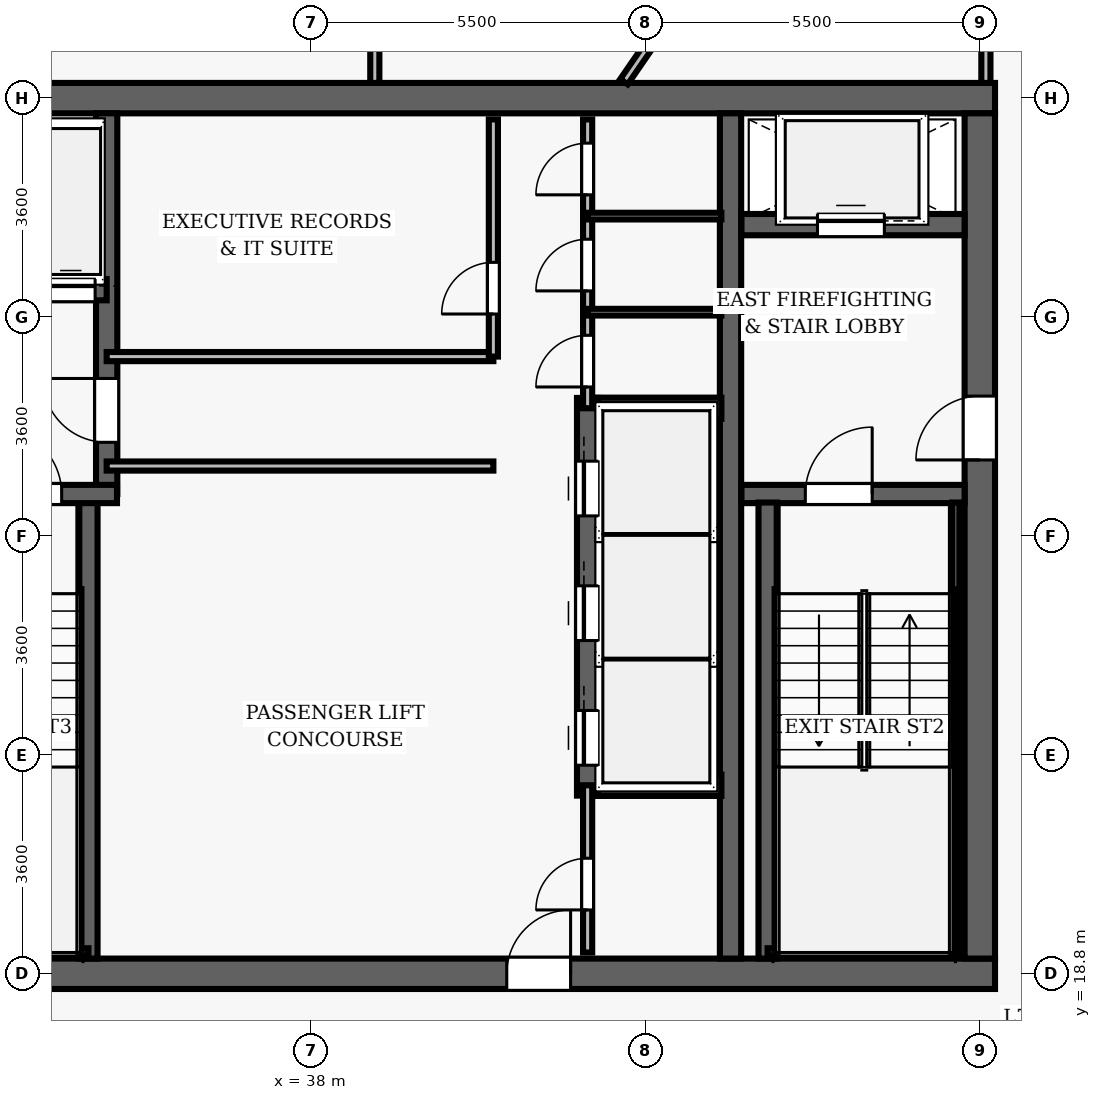
"""IFC4 building model, lengths in metres.
Left out: names, types, materials, properties, quantities, classifications, styles, units other than length and angle.
Written with IfcOpenShell. Run it as: python <this file> out.ifc"""

import sys

from ifc_helpers import new_model, si_unit, direction, frame, frame_2d, origin, place, context, subcontext, project, spatial, rectangle, extrude, element, fill, save


model = new_model("IFC4")
c1 = context("Model", 3, precision=1e-05, world=origin(), true_north=direction((0.0, 1.0)))
c2 = subcontext(c1, "Body", "Model", "MODEL_VIEW")
j1 = project(units=[si_unit("LENGTHUNIT", "METRE"), si_unit("PLANEANGLEUNIT", "RADIAN")], contexts=[c1])
p1 = place(None, origin())
s1 = spatial("IfcSite", under=j1, at=p1, CompositionType="ELEMENT")
p2 = place(p1, origin())
s2 = spatial("IfcBuilding", under=s1, at=p2, CompositionType="ELEMENT")
p3 = place(p2, frame((0.0, 0.0, 303.65)))
s3 = spatial("IfcBuildingStorey", under=s2, at=p3, CompositionType="ELEMENT", Elevation=303.65)
p4 = place(p3, frame((26.75, 18.8, 0.0), z_axis=(0.0, 0.0, 1.0), x_axis=(1.0, 0.0, 0.0)))
e1 = element("IfcWall", 1, at=p4, inside=s3, PredefinedType="SHEAR", context=c2, shape_type="SweptSolid", body=[
    extrude(rectangle(XDim=22.5, YDim=0.5, at=frame_2d((11.25, 0.0))), origin(), (0.0, 0.0, 1.0), 3.85),
])
p5 = place(p4, frame((14.47, 0.0, 0.0)))
e2 = element("IfcOpeningElement", 2, at=p5, cuts=e1, PredefinedType="OPENING", context=c2, shape_type="SweptSolid", body=[
    extrude(rectangle(XDim=1.05, YDim=2.15, at=frame_2d((0.525, 1.075))), frame((0.0, 0.26, 0.0), z_axis=(0.0, -1.0, 0.0), x_axis=(1.0, 0.0, 0.0)), (0.0, 0.0, 1.0), 0.52),
])
p6 = place(p3, frame((26.75, 33.2, 0.0), z_axis=(0.0, 0.0, 1.0), x_axis=(1.0, 0.0, 0.0)))
e3 = element("IfcWall", 3, at=p6, inside=s3, PredefinedType="SHEAR", context=c2, shape_type="SweptSolid", body=[
    extrude(rectangle(XDim=22.5, YDim=0.5, at=frame_2d((11.25, 0.0))), origin(), (0.0, 0.0, 1.0), 3.85),
])
p7 = place(p3, frame((49.0, 19.05, 0.0), z_axis=(0.0, 0.0, 1.0), x_axis=(0.0, 1.0, 0.0)))
e4 = element("IfcWall", 4, at=p7, inside=s3, PredefinedType="SHEAR", context=c2, shape_type="SweptSolid", body=[
    extrude(rectangle(XDim=13.9, YDim=0.5, at=frame_2d((6.95, 0.0))), origin(), (0.0, 0.0, 1.0), 3.85),
])
p8 = place(p7, frame((8.2, 0.0, 0.0)))
e5 = element("IfcOpeningElement", 5, at=p8, cuts=e4, PredefinedType="OPENING", context=c2, shape_type="SweptSolid", body=[
    extrude(rectangle(XDim=1.05, YDim=2.15, at=frame_2d((0.525, 1.075))), frame((0.0, 0.26, 0.0), z_axis=(0.0, -1.0, 0.0), x_axis=(1.0, 0.0, 0.0)), (0.0, 0.0, 1.0), 0.52),
])
p9 = place(p3, frame((44.9, 19.05, 0.0), z_axis=(0.0, 0.0, 1.0), x_axis=(0.0, 1.0, 0.0)))
e6 = element("IfcWall", 6, at=p9, inside=s3, PredefinedType="SHEAR", context=c2, shape_type="SweptSolid", body=[
    extrude(rectangle(XDim=13.9, YDim=0.35, at=frame_2d((6.95, 0.0))), origin(), (0.0, 0.0, 1.0), 3.85),
])
p10 = place(p3, frame((45.08, 26.69, 0.0), z_axis=(0.0, 0.0, 1.0), x_axis=(1.0, 0.0, 0.0)))
e7 = element("IfcWall", 7, at=p10, inside=s3, PredefinedType="SHEAR", context=c2, shape_type="SweptSolid", body=[
    extrude(rectangle(XDim=3.67, YDim=0.3, at=frame_2d((1.835, 0.0))), origin(), (0.0, 0.0, 1.0), 3.85),
])
p11 = place(p10, frame((1.05, 0.0, 0.0)))
e8 = element("IfcOpeningElement", 8, at=p11, cuts=e7, PredefinedType="OPENING", context=c2, shape_type="SweptSolid", body=[
    extrude(rectangle(XDim=1.1, YDim=2.15, at=frame_2d((0.55, 1.075))), frame((0.0, 0.16, 0.0), z_axis=(0.0, -1.0, 0.0), x_axis=(1.0, 0.0, 0.0)), (0.0, 0.0, 1.0), 0.32),
])
p12 = place(p3, frame((45.51, 19.05, 0.0), z_axis=(0.0, 0.0, 1.0), x_axis=(0.0, 1.0, 0.0)))
e9 = element("IfcWall", 9, at=p12, inside=s3, PredefinedType="SHEAR", context=c2, shape_type="SweptSolid", body=[
    extrude(rectangle(XDim=7.5, YDim=0.3, at=frame_2d((3.75, 0.0))), origin(), (0.0, 0.0, 1.0), 3.85),
])
p13 = place(p3, frame((48.605, 19.1, 0.0), z_axis=(0.0, 0.0, 1.0), x_axis=(0.0, 1.0, 0.0)))
e10 = element("IfcWall", 10, at=p13, inside=s3, PredefinedType="SHEAR", context=c2, shape_type="SweptSolid", body=[
    extrude(rectangle(XDim=7.45, YDim=0.12, at=frame_2d((3.725, 0.0))), origin(), (0.0, 0.0, 1.0), 3.85),
])
p14 = place(p3, frame((45.51, 19.16, 0.0), z_axis=(0.0, 0.0, 1.0), x_axis=(1.0, 0.0, 0.0)))
e11 = element("IfcWall", 11, at=p14, inside=s3, PredefinedType="SHEAR", context=c2, shape_type="SweptSolid", body=[
    extrude(rectangle(XDim=3.095, YDim=0.12, at=frame_2d((1.547, 0.0))), origin(), (0.0, 0.0, 1.0), 3.85),
])
p15 = place(p3, frame((45.08, 31.12, 0.0), z_axis=(0.0, 0.0, 1.0), x_axis=(1.0, 0.0, 0.0)))
e12 = element("IfcWall", 12, at=p15, inside=s3, PredefinedType="SHEAR", context=c2, shape_type="SweptSolid", body=[
    extrude(rectangle(XDim=3.67, YDim=0.35, at=frame_2d((1.835, 0.0))), origin(), (0.0, 0.0, 1.0), 3.015),
])
p16 = place(p15, frame((1.25, 0.0, 0.0)))
e13 = element("IfcOpeningElement", 13, at=p16, cuts=e12, PredefinedType="OPENING", context=c2, shape_type="SweptSolid", body=[
    extrude(rectangle(XDim=1.1, YDim=2.15, at=frame_2d((0.55, 1.075))), frame((0.0, 0.185, 0.0), z_axis=(0.0, -1.0, 0.0), x_axis=(1.0, 0.0, 0.0)), (0.0, 0.0, 1.0), 0.37),
])
p17 = place(p3, frame((34.34, 19.05, 0.0), z_axis=(0.0, 0.0, 1.0), x_axis=(0.0, 1.0, 0.0)))
e14 = element("IfcWall", 14, at=p17, inside=s3, PredefinedType="SHEAR", context=c2, shape_type="SweptSolid", body=[
    extrude(rectangle(XDim=7.5, YDim=0.3, at=frame_2d((3.75, 0.0))), origin(), (0.0, 0.0, 1.0), 3.85),
])
p18 = place(p3, frame((34.64, 26.69, 0.0), z_axis=(0.0, 0.0, 1.0), x_axis=(0.0, 1.0, 0.0)))
e15 = element("IfcWall", 15, at=p18, inside=s3, PredefinedType="SHEAR", context=c2, shape_type="SweptSolid", body=[
    extrude(rectangle(XDim=6.26, YDim=0.35, at=frame_2d((3.13, 0.0))), origin(), (0.0, 0.0, 1.0), 3.85),
])
p19 = place(p18, frame((0.85, 0.0, 0.0)))
e16 = element("IfcOpeningElement", 16, at=p19, cuts=e15, PredefinedType="OPENING", context=c2, shape_type="SweptSolid", body=[
    extrude(rectangle(XDim=1.05, YDim=2.15, at=frame_2d((0.525, 1.075))), frame((0.0, 0.185, 0.0), z_axis=(0.0, -1.0, 0.0), x_axis=(1.0, 0.0, 0.0)), (0.0, 0.0, 1.0), 0.37),
])
p20 = place(p3, frame((31.25, 26.69, 0.0), z_axis=(0.0, 0.0, 1.0), x_axis=(1.0, 0.0, 0.0)))
e17 = element("IfcWall", 17, at=p20, inside=s3, PredefinedType="SHEAR", context=c2, shape_type="SweptSolid", body=[
    extrude(rectangle(XDim=3.56, YDim=0.3, at=frame_2d((1.78, 0.0))), origin(), (0.0, 0.0, 1.0), 3.85),
])
p21 = place(p20, frame((1.55, 0.0, 0.0)))
e18 = element("IfcOpeningElement", 18, at=p21, cuts=e17, PredefinedType="OPENING", context=c2, shape_type="SweptSolid", body=[
    extrude(rectangle(XDim=1.1, YDim=2.15, at=frame_2d((0.55, 1.075))), frame((0.0, 0.16, 0.0), z_axis=(0.0, -1.0, 0.0), x_axis=(1.0, 0.0, 0.0)), (0.0, 0.0, 1.0), 0.32),
])
p22 = place(p3, frame((31.3, 19.16, 0.0), z_axis=(0.0, 0.0, 1.0), x_axis=(1.0, 0.0, 0.0)))
e19 = element("IfcWall", 19, at=p22, inside=s3, PredefinedType="SHEAR", context=c2, shape_type="SweptSolid", body=[
    extrude(rectangle(XDim=3.04, YDim=0.12, at=frame_2d((1.52, 0.0))), origin(), (0.0, 0.0, 1.0), 3.85),
])
p23 = place(p3, frame((32.23, 30.05, 0.0), z_axis=(0.0, 0.0, 1.0), x_axis=(1.0, 0.0, 0.0)))
e20 = element("IfcWall", 20, at=p23, inside=s3, PredefinedType="SHEAR", context=c2, shape_type="SweptSolid", body=[
    extrude(rectangle(XDim=2.41, YDim=0.35, at=frame_2d((1.205, 0.0))), origin(), (0.0, 0.0, 1.0), 3.015),
])
p24 = place(p23, frame((0.42, 0.0, 0.0)))
e21 = element("IfcOpeningElement", 21, at=p24, cuts=e20, PredefinedType="OPENING", context=c2, shape_type="SweptSolid", body=[
    extrude(rectangle(XDim=0.8, YDim=2.15, at=frame_2d((0.4, 1.075))), frame((0.0, 0.185, 0.0), z_axis=(0.0, -1.0, 0.0), x_axis=(1.0, 0.0, 0.0)), (0.0, 0.0, 1.0), 0.37),
])
p25 = place(p23, frame((1.42, 0.0, 0.0)))
e22 = element("IfcOpeningElement", 22, at=p25, cuts=e20, PredefinedType="OPENING", context=c2, shape_type="SweptSolid", body=[
    extrude(rectangle(XDim=0.8, YDim=2.15, at=frame_2d((0.4, 1.075))), frame((0.0, 0.185, 0.0), z_axis=(0.0, -1.0, 0.0), x_axis=(1.0, 0.0, 0.0)), (0.0, 0.0, 1.0), 0.37),
])
p26 = place(p3, frame((42.55, 21.73, 0.0), z_axis=(0.0, 0.0, 1.0), x_axis=(0.0, 1.0, 0.0)))
e23 = element("IfcWall", 23, at=p26, inside=s3, PredefinedType="SHEAR", context=c2, shape_type="SweptSolid", body=[
    extrude(rectangle(XDim=6.54, YDim=0.35, at=frame_2d((3.27, 0.0))), origin(), (0.0, 0.0, 1.0), 3.015),
])
p27 = place(p26, frame((0.5, 0.0, 0.0)))
e24 = element("IfcOpeningElement", 24, at=p27, cuts=e23, PredefinedType="OPENING", context=c2, shape_type="SweptSolid", body=[
    extrude(rectangle(XDim=0.9, YDim=2.15, at=frame_2d((0.45, 1.075))), frame((0.0, 0.185, 0.0), z_axis=(0.0, -1.0, 0.0), x_axis=(1.0, 0.0, 0.0)), (0.0, 0.0, 1.0), 0.37),
])
p28 = place(p26, frame((2.55, 0.0, 0.0)))
e25 = element("IfcOpeningElement", 25, at=p28, cuts=e23, PredefinedType="OPENING", context=c2, shape_type="SweptSolid", body=[
    extrude(rectangle(XDim=0.9, YDim=2.15, at=frame_2d((0.45, 1.075))), frame((0.0, 0.185, 0.0), z_axis=(0.0, -1.0, 0.0), x_axis=(1.0, 0.0, 0.0)), (0.0, 0.0, 1.0), 0.37),
])
p29 = place(p26, frame((4.6, 0.0, 0.0)))
e26 = element("IfcOpeningElement", 26, at=p29, cuts=e23, PredefinedType="OPENING", context=c2, shape_type="SweptSolid", body=[
    extrude(rectangle(XDim=0.9, YDim=2.15, at=frame_2d((0.45, 1.075))), frame((0.0, 0.185, 0.0), z_axis=(0.0, -1.0, 0.0), x_axis=(1.0, 0.0, 0.0)), (0.0, 0.0, 1.0), 0.37),
])
for number, where, z_axis, x_axis in (
    (27, (42.72, 21.9, 0.0), (0.0, 0.0, 1.0), (1.0, 0.0, 0.0)),
    (28, (42.72, 28.1, 0.0), (0.0, 0.0, 1.0), (1.0, 0.0, 0.0)),
):
    element("IfcWall", number, at=place(p3, frame(where, z_axis=z_axis, x_axis=x_axis)), inside=s3, PredefinedType="SHEAR", context=c2, shape_type="SweptSolid", body=[
        extrude(rectangle(XDim=2.03, YDim=0.35, at=frame_2d((1.015, 0.0))), origin(), (0.0, 0.0, 1.0), 3.015),
    ])
for number, where, z_axis, x_axis in (
    (29, (34.64, 27.15, 0.0), (0.0, 0.0, 1.0), (1.0, 0.0, 0.0)),
    (30, (34.64, 28.95, 0.0), (0.0, 0.0, 1.0), (1.0, 0.0, 0.0)),
):
    element("IfcWall", number, at=place(p3, frame(where, z_axis=z_axis, x_axis=x_axis)), inside=s3, PredefinedType="PARTITIONING", context=c2, shape_type="SweptSolid", body=[
        extrude(rectangle(XDim=6.36, YDim=0.15, at=frame_2d((3.18, 0.0))), origin(), (0.0, 0.0, 1.0), 3.015),
    ])
p30 = place(p3, frame((41.0, 28.95, 0.0), z_axis=(0.0, 0.0, 1.0), x_axis=(0.0, 1.0, 0.0)))
e31 = element("IfcWall", 31, at=p30, inside=s3, PredefinedType="PARTITIONING", context=c2, shape_type="SweptSolid", body=[
    extrude(rectangle(XDim=3.9, YDim=0.15, at=frame_2d((1.95, 0.0))), origin(), (0.0, 0.0, 1.0), 3.015),
])
p31 = place(p30, frame((0.7, 0.0, 0.0)))
e32 = element("IfcOpeningElement", 32, at=p31, cuts=e31, PredefinedType="OPENING", context=c2, shape_type="SweptSolid", body=[
    extrude(rectangle(XDim=0.85, YDim=2.1, at=frame_2d((0.425, 1.05))), frame((0.0, 0.085, 0.0), z_axis=(0.0, -1.0, 0.0), x_axis=(1.0, 0.0, 0.0)), (0.0, 0.0, 1.0), 0.17),
])
p32 = place(p3, frame((42.55, 28.1, 0.0), z_axis=(0.0, 0.0, 1.0), x_axis=(0.0, 1.0, 0.0)))
e33 = element("IfcWall", 33, at=p32, inside=s3, PredefinedType="PARTITIONING", context=c2, shape_type="SweptSolid", body=[
    extrude(rectangle(XDim=4.75, YDim=0.15, at=frame_2d((2.375, 0.0))), origin(), (0.0, 0.0, 1.0), 3.015),
])
p33 = place(p32, frame((0.35, 0.0, 0.0)))
e34 = element("IfcOpeningElement", 34, at=p33, cuts=e33, PredefinedType="OPENING", context=c2, shape_type="SweptSolid", body=[
    extrude(rectangle(XDim=0.85, YDim=2.1, at=frame_2d((0.425, 1.05))), frame((0.0, 0.085, 0.0), z_axis=(0.0, -1.0, 0.0), x_axis=(1.0, 0.0, 0.0)), (0.0, 0.0, 1.0), 0.17),
])
p34 = place(p32, frame((1.93, 0.0, 0.0)))
e35 = element("IfcOpeningElement", 35, at=p34, cuts=e33, PredefinedType="OPENING", context=c2, shape_type="SweptSolid", body=[
    extrude(rectangle(XDim=0.85, YDim=2.1, at=frame_2d((0.425, 1.05))), frame((0.0, 0.085, 0.0), z_axis=(0.0, -1.0, 0.0), x_axis=(1.0, 0.0, 0.0)), (0.0, 0.0, 1.0), 0.17),
])
p35 = place(p32, frame((3.51, 0.0, 0.0)))
e36 = element("IfcOpeningElement", 36, at=p35, cuts=e33, PredefinedType="OPENING", context=c2, shape_type="SweptSolid", body=[
    extrude(rectangle(XDim=0.85, YDim=2.1, at=frame_2d((0.425, 1.05))), frame((0.0, 0.085, 0.0), z_axis=(0.0, -1.0, 0.0), x_axis=(1.0, 0.0, 0.0)), (0.0, 0.0, 1.0), 0.17),
])
for number, where, z_axis, x_axis in (
    (37, (42.55, 29.68, 0.0), (0.0, 0.0, 1.0), (1.0, 0.0, 0.0)),
    (38, (42.55, 31.26, 0.0), (0.0, 0.0, 1.0), (1.0, 0.0, 0.0)),
):
    element("IfcWall", number, at=place(p3, frame(where, z_axis=z_axis, x_axis=x_axis)), inside=s3, PredefinedType="PARTITIONING", context=c2, shape_type="SweptSolid", body=[
        extrude(rectangle(XDim=2.2, YDim=0.11, at=frame_2d((1.1, 0.0))), origin(), (0.0, 0.0, 1.0), 3.015),
    ])
p36 = place(p3, frame((42.55, 19.15, 0.0), z_axis=(0.0, 0.0, 1.0), x_axis=(0.0, 1.0, 0.0)))
e39 = element("IfcWall", 39, at=p36, inside=s3, PredefinedType="PARTITIONING", context=c2, shape_type="SweptSolid", body=[
    extrude(rectangle(XDim=2.75, YDim=0.15, at=frame_2d((1.375, 0.0))), origin(), (0.0, 0.0, 1.0), 3.015),
])
p37 = place(p36, frame((0.7, 0.0, 0.0)))
e40 = element("IfcOpeningElement", 40, at=p37, cuts=e39, PredefinedType="OPENING", context=c2, shape_type="SweptSolid", body=[
    extrude(rectangle(XDim=0.85, YDim=2.1, at=frame_2d((0.425, 1.05))), frame((0.0, 0.085, 0.0), z_axis=(0.0, -1.0, 0.0), x_axis=(1.0, 0.0, 0.0)), (0.0, 0.0, 1.0), 0.17),
])
p38 = place(p3, frame((49.1, 33.45, 0.0), z_axis=(0.0, 0.0, 1.0), x_axis=(0.0, 1.0, 0.0)))
e41 = element("IfcWall", 41, at=p38, inside=s3, PredefinedType="PARTITIONING", context=c2, shape_type="SweptSolid", body=[
    extrude(rectangle(XDim=7.95, YDim=0.15, at=frame_2d((3.975, 0.0))), origin(), (0.0, 0.0, 1.0), 3.015),
])
p39 = place(p3, frame((39.05, 33.45, 0.0), z_axis=(0.0, 0.0, 1.0), x_axis=(0.0, 1.0, 0.0)))
e42 = element("IfcWall", 42, at=p39, inside=s3, PredefinedType="PARTITIONING", context=c2, shape_type="SweptSolid", body=[
    extrude(rectangle(XDim=6.95, YDim=0.15, at=frame_2d((3.475, 0.0))), origin(), (0.0, 0.0, 1.0), 3.015),
])
p40 = place(p39, frame((0.988, 0.0, 0.0)))
e43 = element("IfcOpeningElement", 43, at=p40, cuts=e42, PredefinedType="OPENING", context=c2, shape_type="SweptSolid", body=[
    extrude(rectangle(XDim=1.5, YDim=2.2, at=frame_2d((0.75, 1.1))), frame((0.0, 0.085, 0.0), z_axis=(0.0, -1.0, 0.0), x_axis=(1.0, 0.0, 0.0)), (0.0, 0.0, 1.0), 0.17),
])
p41 = place(p3, frame((43.148, 33.47, 0.0), z_axis=(0.0, 0.0, 1.0), x_axis=(0.567425051225, 0.823425048952, 0.0)))
e44 = element("IfcWall", 44, at=p41, inside=s3, PredefinedType="PARTITIONING", context=c2, shape_type="SweptSolid", body=[
    extrude(rectangle(XDim=12.712, YDim=0.15, at=frame_2d((6.356, 0.0))), origin(), (0.0, 0.0, 1.0), 3.015),
])
p42 = place(p11, origin())
e45 = element("IfcDoor", 45, at=p42, inside=s3, OperationType="SINGLE_SWING_RIGHT", PredefinedType="DOOR", context=c2, shape_type="SweptSolid", body=[
    extrude(rectangle(XDim=1.1, YDim=2.15, at=frame_2d((0.55, 1.075))), frame((0.0, 0.025, 0.0), z_axis=(0.0, -1.0, 0.0), x_axis=(1.0, 0.0, 0.0)), (0.0, 0.0, 1.0), 0.05),
])
fill(e8, e45)
p43 = place(p8, origin())
e46 = element("IfcDoor", 46, at=p43, inside=s3, OperationType="SINGLE_SWING_LEFT", PredefinedType="DOOR", context=c2, shape_type="SweptSolid", body=[
    extrude(rectangle(XDim=1.05, YDim=2.15, at=frame_2d((0.525, 1.075))), frame((0.0, 0.025, 0.0), z_axis=(0.0, -1.0, 0.0), x_axis=(1.0, 0.0, 0.0)), (0.0, 0.0, 1.0), 0.05),
])
fill(e5, e46)
p44 = place(p21, origin())
e47 = element("IfcDoor", 47, at=p44, inside=s3, OperationType="SINGLE_SWING_LEFT", PredefinedType="DOOR", context=c2, shape_type="SweptSolid", body=[
    extrude(rectangle(XDim=1.1, YDim=2.15, at=frame_2d((0.55, 1.075))), frame((0.0, 0.025, 0.0), z_axis=(0.0, -1.0, 0.0), x_axis=(1.0, 0.0, 0.0)), (0.0, 0.0, 1.0), 0.05),
])
fill(e18, e47)
p45 = place(p5, origin())
e48 = element("IfcDoor", 48, at=p45, inside=s3, OperationType="SINGLE_SWING_RIGHT", PredefinedType="DOOR", context=c2, shape_type="SweptSolid", body=[
    extrude(rectangle(XDim=1.05, YDim=2.15, at=frame_2d((0.525, 1.075))), frame((0.0, 0.025, 0.0), z_axis=(0.0, -1.0, 0.0), x_axis=(1.0, 0.0, 0.0)), (0.0, 0.0, 1.0), 0.05),
])
fill(e2, e48)
p46 = place(p19, origin())
e49 = element("IfcDoor", 49, at=p46, inside=s3, OperationType="SINGLE_SWING_RIGHT", PredefinedType="DOOR", context=c2, shape_type="SweptSolid", body=[
    extrude(rectangle(XDim=1.05, YDim=2.15, at=frame_2d((0.525, 1.075))), frame((0.0, 0.025, 0.0), z_axis=(0.0, -1.0, 0.0), x_axis=(1.0, 0.0, 0.0)), (0.0, 0.0, 1.0), 0.05),
])
fill(e16, e49)
p47 = place(p31, origin())
e50 = element("IfcDoor", 50, at=p47, inside=s3, OperationType="SINGLE_SWING_LEFT", PredefinedType="DOOR", context=c2, shape_type="SweptSolid", body=[
    extrude(rectangle(XDim=0.85, YDim=2.1, at=frame_2d((0.425, 1.05))), frame((0.0, 0.025, 0.0), z_axis=(0.0, -1.0, 0.0), x_axis=(1.0, 0.0, 0.0)), (0.0, 0.0, 1.0), 0.05),
])
fill(e32, e50)
p48 = place(p33, origin())
e51 = element("IfcDoor", 51, at=p48, inside=s3, OperationType="SINGLE_SWING_LEFT", PredefinedType="DOOR", context=c2, shape_type="SweptSolid", body=[
    extrude(rectangle(XDim=0.85, YDim=2.1, at=frame_2d((0.425, 1.05))), frame((0.0, 0.025, 0.0), z_axis=(0.0, -1.0, 0.0), x_axis=(1.0, 0.0, 0.0)), (0.0, 0.0, 1.0), 0.05),
])
fill(e34, e51)
p49 = place(p34, origin())
e52 = element("IfcDoor", 52, at=p49, inside=s3, OperationType="SINGLE_SWING_LEFT", PredefinedType="DOOR", context=c2, shape_type="SweptSolid", body=[
    extrude(rectangle(XDim=0.85, YDim=2.1, at=frame_2d((0.425, 1.05))), frame((0.0, 0.025, 0.0), z_axis=(0.0, -1.0, 0.0), x_axis=(1.0, 0.0, 0.0)), (0.0, 0.0, 1.0), 0.05),
])
fill(e35, e52)
p50 = place(p35, origin())
e53 = element("IfcDoor", 53, at=p50, inside=s3, OperationType="SINGLE_SWING_LEFT", PredefinedType="DOOR", context=c2, shape_type="SweptSolid", body=[
    extrude(rectangle(XDim=0.85, YDim=2.1, at=frame_2d((0.425, 1.05))), frame((0.0, 0.025, 0.0), z_axis=(0.0, -1.0, 0.0), x_axis=(1.0, 0.0, 0.0)), (0.0, 0.0, 1.0), 0.05),
])
fill(e36, e53)
p51 = place(p37, origin())
e54 = element("IfcDoor", 54, at=p51, inside=s3, OperationType="SINGLE_SWING_LEFT", PredefinedType="DOOR", context=c2, shape_type="SweptSolid", body=[
    extrude(rectangle(XDim=0.85, YDim=2.1, at=frame_2d((0.425, 1.05))), frame((0.0, 0.025, 0.0), z_axis=(0.0, -1.0, 0.0), x_axis=(1.0, 0.0, 0.0)), (0.0, 0.0, 1.0), 0.05),
])
fill(e40, e54)
p52 = place(p27, origin())
e55 = element("IfcDoor", 55, at=p52, inside=s3, OperationType="SLIDING_TO_LEFT", PredefinedType="DOOR", context=c2, shape_type="SweptSolid", body=[
    extrude(rectangle(XDim=0.9, YDim=2.15, at=frame_2d((0.45, 1.075))), frame((0.0, 0.025, 0.0), z_axis=(0.0, -1.0, 0.0), x_axis=(1.0, 0.0, 0.0)), (0.0, 0.0, 1.0), 0.05),
])
fill(e24, e55)
p53 = place(p28, origin())
e56 = element("IfcDoor", 56, at=p53, inside=s3, OperationType="SLIDING_TO_LEFT", PredefinedType="DOOR", context=c2, shape_type="SweptSolid", body=[
    extrude(rectangle(XDim=0.9, YDim=2.15, at=frame_2d((0.45, 1.075))), frame((0.0, 0.025, 0.0), z_axis=(0.0, -1.0, 0.0), x_axis=(1.0, 0.0, 0.0)), (0.0, 0.0, 1.0), 0.05),
])
fill(e25, e56)
p54 = place(p29, origin())
e57 = element("IfcDoor", 57, at=p54, inside=s3, OperationType="SLIDING_TO_LEFT", PredefinedType="DOOR", context=c2, shape_type="SweptSolid", body=[
    extrude(rectangle(XDim=0.9, YDim=2.15, at=frame_2d((0.45, 1.075))), frame((0.0, 0.025, 0.0), z_axis=(0.0, -1.0, 0.0), x_axis=(1.0, 0.0, 0.0)), (0.0, 0.0, 1.0), 0.05),
])
fill(e26, e57)
p55 = place(p16, origin())
e58 = element("IfcDoor", 58, at=p55, inside=s3, OperationType="SLIDING_TO_LEFT", PredefinedType="DOOR", context=c2, shape_type="SweptSolid", body=[
    extrude(rectangle(XDim=1.1, YDim=2.15, at=frame_2d((0.55, 1.075))), frame((0.0, 0.025, 0.0), z_axis=(0.0, -1.0, 0.0), x_axis=(1.0, 0.0, 0.0)), (0.0, 0.0, 1.0), 0.05),
])
fill(e13, e58)
p56 = place(p25, origin())
e59 = element("IfcDoor", 59, at=p56, inside=s3, OperationType="SLIDING_TO_LEFT", PredefinedType="DOOR", context=c2, shape_type="SweptSolid", body=[
    extrude(rectangle(XDim=0.8, YDim=2.15, at=frame_2d((0.4, 1.075))), frame((0.0, 0.025, 0.0), z_axis=(0.0, -1.0, 0.0), x_axis=(1.0, 0.0, 0.0)), (0.0, 0.0, 1.0), 0.05),
])
fill(e22, e59)
save(model, sys.argv[1])
